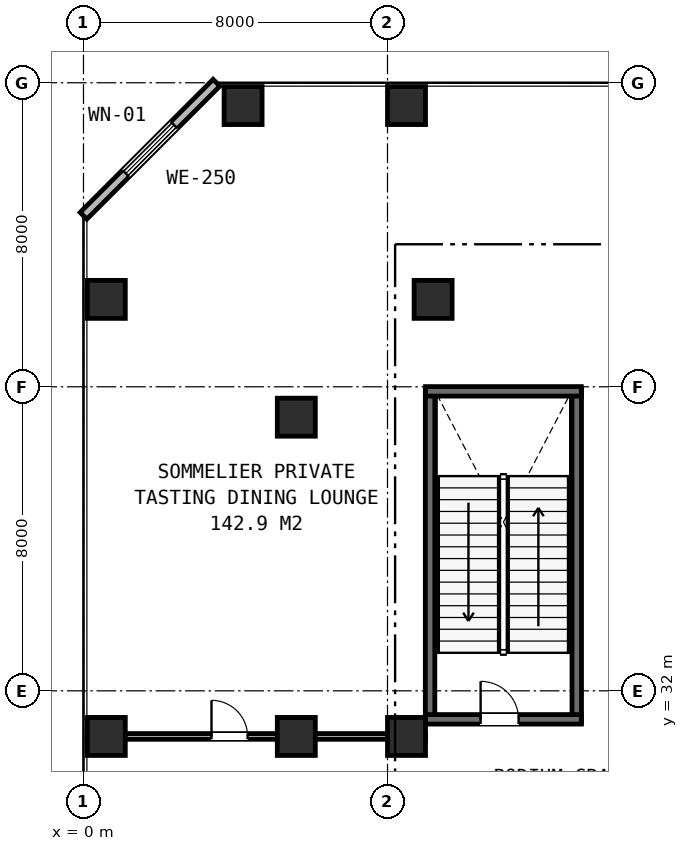
"""IFC4 building model, lengths in metres.
Left out: names, types, materials, properties, quantities, classifications, styles, units other than length and angle.
Written with IfcOpenShell. Run it as: python <this file> out.ifc"""

import sys

from ifc_helpers import new_model, si_unit, direction, frame, frame_2d, origin, origin_2d, place, context, subcontext, project, spatial, rectangle, extrude, element, fill, save


model = new_model("IFC4")
c1 = context("Model", 3, precision=1e-05, world=origin(), true_north=direction((0.0, 1.0)))
c2 = subcontext(c1, "Body", "Model", "MODEL_VIEW")
j1 = project(units=[si_unit("LENGTHUNIT", "METRE"), si_unit("PLANEANGLEUNIT", "RADIAN")], contexts=[c1])
p1 = place(None, origin())
s1 = spatial("IfcSite", under=j1, at=p1, CompositionType="ELEMENT")
p2 = place(p1, origin())
s2 = spatial("IfcBuilding", under=s1, at=p2, CompositionType="ELEMENT")
p3 = place(p2, frame((0.0, 0.0, 6.0)))
s3 = spatial("IfcBuildingStorey", under=s2, at=p3, CompositionType="ELEMENT", Elevation=6.0)
for number, where, z_axis, x_axis in (
    (1, (9.12, 31.15, 0.0), (0.0, 0.0, 1.0), (0.0, 1.0, 0.0)),
    (2, (12.98, 31.15, 0.0), (0.0, 0.0, 1.0), (0.0, 1.0, 0.0)),
):
    element("IfcWall", number, at=place(p3, frame(where, z_axis=z_axis, x_axis=x_axis)), inside=s3, PredefinedType="SHEAR", context=c2, shape_type="SweptSolid", body=[
        extrude(rectangle(XDim=8.8, YDim=0.25, at=frame_2d((4.4, 0.0))), origin(), (0.0, 0.0, 1.0), 5.1),
    ])
p4 = place(p3, frame((9.0, 39.88, 0.0), z_axis=(0.0, 0.0, 1.0), x_axis=(1.0, 0.0, 0.0)))
e3 = element("IfcWall", 3, at=p4, inside=s3, PredefinedType="SHEAR", context=c2, shape_type="SweptSolid", body=[
    extrude(rectangle(XDim=4.1, YDim=0.25, at=frame_2d((2.05, 0.0))), origin(), (0.0, 0.0, 1.0), 5.1),
])
p5 = place(p3, frame((9.0, 31.25, 0.0), z_axis=(0.0, 0.0, 1.0), x_axis=(1.0, 0.0, 0.0)))
e4 = element("IfcWall", 4, at=p5, inside=s3, PredefinedType="SHEAR", context=c2, shape_type="SweptSolid", body=[
    extrude(rectangle(XDim=4.1, YDim=0.25, at=frame_2d((2.05, 0.0))), origin(), (0.0, 0.0, 1.0), 5.1),
])
p6 = place(p5, frame((1.45, 0.0, 0.0)))
e5 = element("IfcOpeningElement", 5, at=p6, cuts=e4, PredefinedType="OPENING", context=c2, shape_type="SweptSolid", body=[
    extrude(rectangle(XDim=1.0, YDim=2.15, at=frame_2d((0.5, 1.075))), frame((0.0, 0.135, 0.0), z_axis=(0.0, -1.0, 0.0), x_axis=(1.0, 0.0, 0.0)), (0.0, 0.0, 1.0), 0.27),
])
for number, where, z_axis, x_axis in (
    (6, (5.6, 30.8, 0.0), (0.0, 0.0, 1.0), (1.0, 0.0, 0.0)),
    (7, (5.6, 39.2, 0.0), (0.0, 0.0, 1.0), (1.0, 0.0, 0.0)),
    (8, (8.5, 30.8, 0.0), (0.0, 0.0, 1.0), (1.0, 0.0, 0.0)),
    (9, (9.2, 42.3, 0.0), (0.0, 0.0, 1.0), (1.0, 0.0, 0.0)),
    (10, (0.6, 30.8, 0.0), (0.0, 0.0, 1.0), (1.0, 0.0, 0.0)),
    (11, (0.6, 42.3, 0.0), (0.0, 0.0, 1.0), (1.0, 0.0, 0.0)),
    (12, (4.2, 47.4, 0.0), (0.0, 0.0, 1.0), (1.0, 0.0, 0.0)),
    (13, (8.5, 47.4, 0.0), (0.0, 0.0, 1.0), (1.0, 0.0, 0.0)),
):
    element("IfcColumn", number, at=place(p3, frame(where, z_axis=z_axis, x_axis=x_axis)), inside=s3, PredefinedType="COLUMN", context=c2, shape_type="SweptSolid", body=[
        extrude(rectangle(XDim=1.0, YDim=1.0, at=origin_2d()), origin(), (0.0, 0.0, 1.0), 5.1),
    ])
p7 = place(p3, frame((3.5, 48.0, 0.0), z_axis=(0.0, 0.0, 1.0), x_axis=(-0.707106781187, -0.707106781187, 0.0)))
e14 = element("IfcWall", 14, at=p7, inside=s3, PredefinedType="STANDARD", context=c2, shape_type="SweptSolid", body=[
    extrude(rectangle(XDim=4.95, YDim=0.25, at=frame_2d((2.475, 0.0))), origin(), (0.0, 0.0, 1.0), 4.77),
])
p8 = place(p7, frame((1.575, 0.0, 0.75)))
e15 = element("IfcOpeningElement", 15, at=p8, cuts=e14, PredefinedType="OPENING", context=c2, shape_type="SweptSolid", body=[
    extrude(rectangle(XDim=1.8, YDim=1.85, at=frame_2d((0.9, 0.925))), frame((0.0, 0.135, 0.0), z_axis=(0.0, -1.0, 0.0), x_axis=(1.0, 0.0, 0.0)), (0.0, 0.0, 1.0), 0.27),
])
p9 = place(p3, frame((0.1, 30.8, 0.0), z_axis=(0.0, 0.0, 1.0), x_axis=(1.0, 0.0, 0.0)))
e16 = element("IfcWall", 16, at=p9, inside=s3, PredefinedType="PARTITIONING", context=c2, shape_type="SweptSolid", body=[
    extrude(rectangle(XDim=8.9, YDim=0.15, at=frame_2d((4.45, 0.0))), origin(), (0.0, 0.0, 1.0), 4.12),
])
p10 = place(p9, frame((3.268, 0.0, 0.0)))
e17 = element("IfcOpeningElement", 17, at=p10, cuts=e16, PredefinedType="OPENING", context=c2, shape_type="SweptSolid", body=[
    extrude(rectangle(XDim=0.95, YDim=2.15, at=frame_2d((0.475, 1.075))), frame((0.0, 0.085, 0.0), z_axis=(0.0, -1.0, 0.0), x_axis=(1.0, 0.0, 0.0)), (0.0, 0.0, 1.0), 0.17),
])
p11 = place(p8, origin())
e18 = element("IfcWindow", 18, at=p11, inside=s3, PartitioningType="SINGLE_PANEL", PredefinedType="WINDOW", context=c2, shape_type="SweptSolid", body=[
    extrude(rectangle(XDim=1.8, YDim=1.85, at=frame_2d((0.9, 0.925))), frame((0.0, 0.03, 0.0), z_axis=(0.0, -1.0, 0.0), x_axis=(1.0, 0.0, 0.0)), (0.0, 0.0, 1.0), 0.06),
])
fill(e15, e18)
p12 = place(p6, origin())
e19 = element("IfcDoor", 19, at=p12, inside=s3, OperationType="SINGLE_SWING_LEFT", PredefinedType="DOOR", context=c2, shape_type="SweptSolid", body=[
    extrude(rectangle(XDim=1.0, YDim=2.15, at=frame_2d((0.5, 1.075))), frame((0.0, 0.025, 0.0), z_axis=(0.0, -1.0, 0.0), x_axis=(1.0, 0.0, 0.0)), (0.0, 0.0, 1.0), 0.05),
])
fill(e5, e19)
p13 = place(p10, origin())
e20 = element("IfcDoor", 20, at=p13, inside=s3, OperationType="SINGLE_SWING_LEFT", PredefinedType="DOOR", context=c2, shape_type="SweptSolid", body=[
    extrude(rectangle(XDim=0.95, YDim=2.15, at=frame_2d((0.475, 1.075))), frame((0.0, 0.025, 0.0), z_axis=(0.0, -1.0, 0.0), x_axis=(1.0, 0.0, 0.0)), (0.0, 0.0, 1.0), 0.05),
])
fill(e17, e20)
save(model, sys.argv[1])
